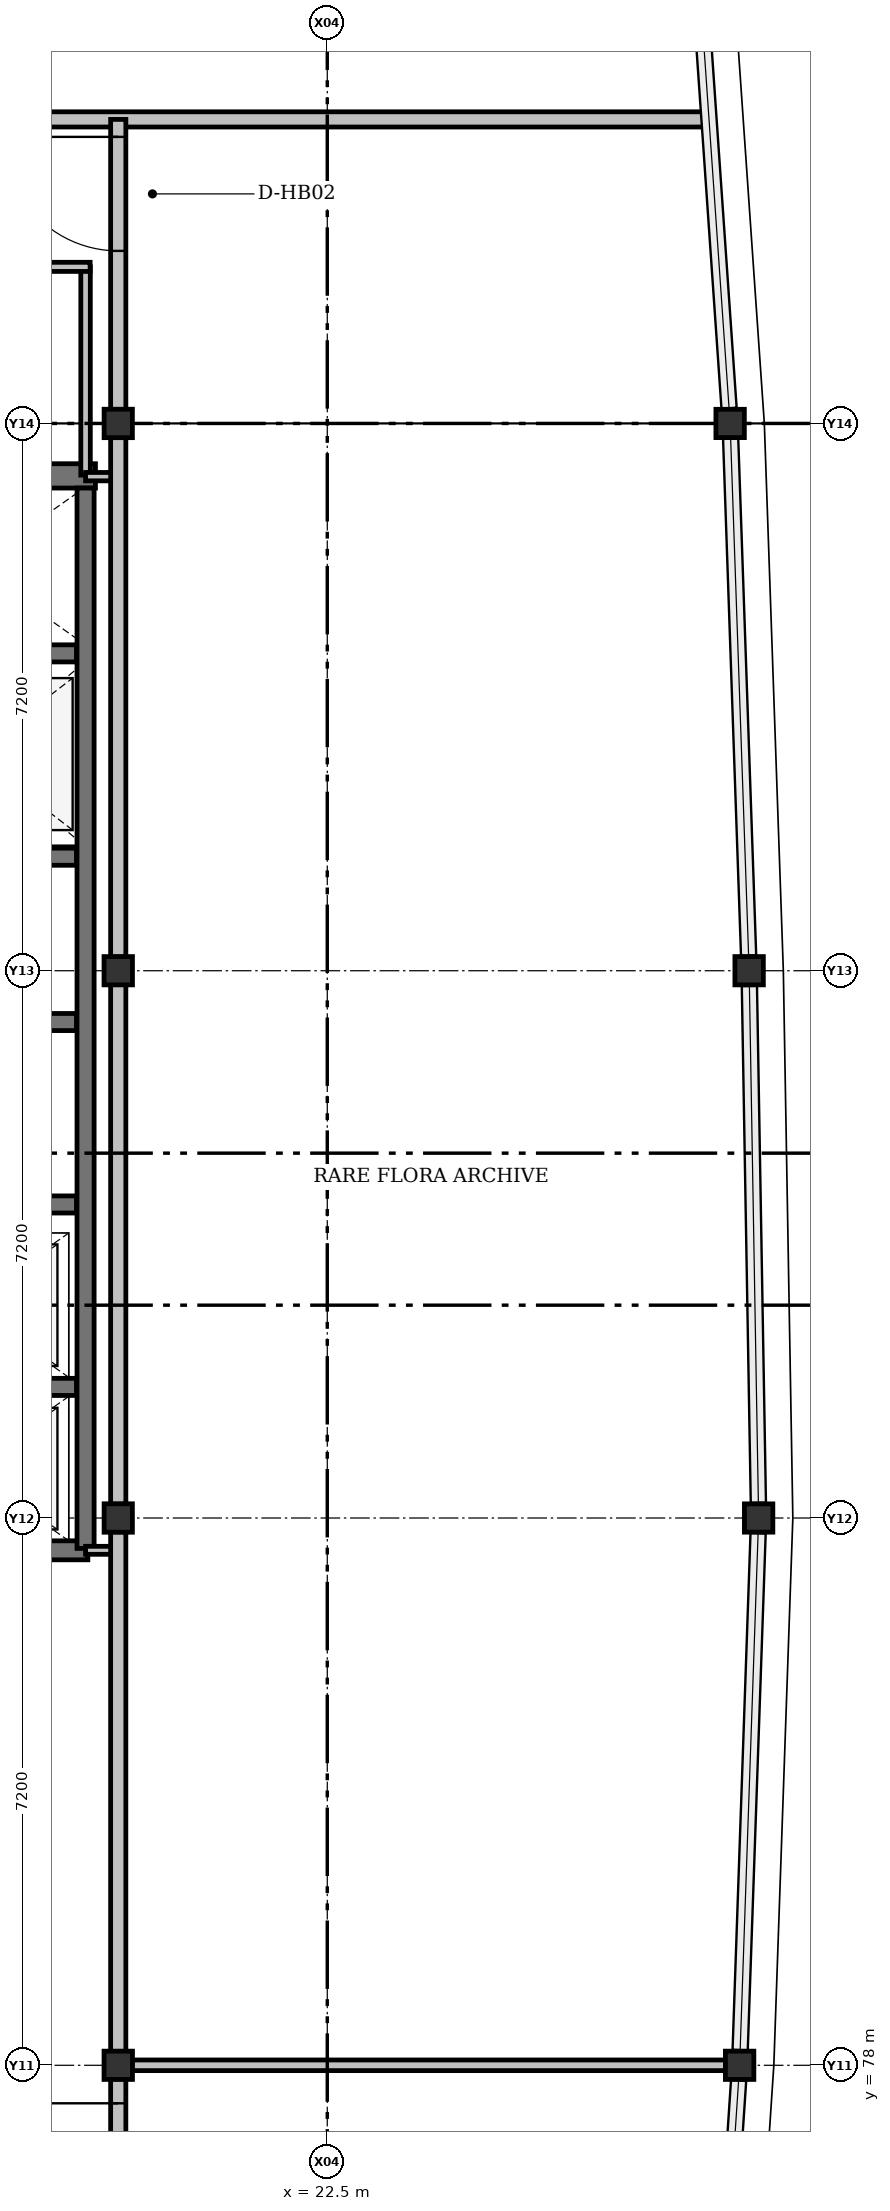
"""IFC4 building model, lengths in metres.
Left out: names, types, materials, properties, quantities, classifications, styles, units other than length and angle.
Written with IfcOpenShell. Run it as: python <this file> out.ifc"""

import sys

from ifc_helpers import new_model, si_unit, direction, frame, frame_2d, origin, origin_2d, place, context, subcontext, project, spatial, rectangle, i_section, extrude, element, fill, save


model = new_model("IFC4")
c1 = context("Model", 3, precision=1e-05, world=origin(), true_north=direction((0.0, 1.0)))
c2 = subcontext(c1, "Body", "Model", "MODEL_VIEW")
j1 = project(units=[si_unit("LENGTHUNIT", "METRE"), si_unit("PLANEANGLEUNIT", "RADIAN")], contexts=[c1])
p1 = place(None, origin())
s1 = spatial("IfcSite", under=j1, at=p1, CompositionType="ELEMENT")
p2 = place(p1, origin())
s2 = spatial("IfcBuilding", under=s1, at=p2, CompositionType="ELEMENT")
p3 = place(p2, frame((0.0, 0.0, 30.9)))
s3 = spatial("IfcBuildingStorey", under=s2, at=p3, CompositionType="ELEMENT", Elevation=30.9)
for number, where, z_axis, x_axis in (
    (1, (19.75, 78.0, 0.0), (0.0, 0.0, 1.0), (1.0, 0.0, 0.0)),
    (2, (27.925, 78.0, 0.0), (0.0, 0.0, 1.0), (1.0, 0.0, 0.0)),
    (3, (19.75, 85.2, 0.0), (0.0, 0.0, 1.0), (0.0, 1.0, 0.0)),
    (4, (28.175, 85.2, 0.0), (0.0, 0.0, 1.0), (1.0, 0.0, 0.0)),
    (5, (19.75, 92.4, 0.0), (0.0, 0.0, 1.0), (1.0, 0.0, 0.0)),
    (6, (28.05, 92.4, 0.0), (0.0, 0.0, 1.0), (1.0, 0.0, 0.0)),
    (7, (19.75, 99.6, 0.0), (0.0, 0.0, 1.0), (0.0, 1.0, 0.0)),
    (8, (27.8, 99.6, 0.0), (0.0, 0.0, 1.0), (1.0, 0.0, 0.0)),
):
    element("IfcColumn", number, at=place(p3, frame(where, z_axis=z_axis, x_axis=x_axis)), inside=s3, PredefinedType="COLUMN", context=c2, shape_type="SweptSolid", body=[
        extrude(i_section(OverallWidth=0.374, OverallDepth=0.372, WebThickness=0.016, FlangeThickness=0.026, FilletRadius=0.015, at=origin_2d()), origin(), (0.0, 0.0, 1.0), 4.2),
    ])
p4 = place(p3, frame((16.15, 98.91, 0.0), z_axis=(0.0, 0.0, 1.0), x_axis=(1.0, 0.0, 0.0)))
e9 = element("IfcWall", 9, at=p4, inside=s3, PredefinedType="SHEAR", context=c2, shape_type="SweptSolid", body=[
    extrude(rectangle(XDim=3.3, YDim=0.32, at=frame_2d((1.65, 0.0))), origin(), (0.0, 0.0, 1.0), 4.2),
])
p5 = place(p3, frame((16.4, 84.775, 0.0), z_axis=(0.0, 0.0, 1.0), x_axis=(1.0, 0.0, 0.0)))
e10 = element("IfcWall", 10, at=p5, inside=s3, PredefinedType="SHEAR", context=c2, shape_type="SweptSolid", body=[
    extrude(rectangle(XDim=2.95, YDim=0.25, at=frame_2d((1.475, 0.0))), origin(), (0.0, 0.0, 1.0), 4.2),
])
p6 = place(p3, frame((19.32, 84.8, 0.0), z_axis=(0.0, 0.0, 1.0), x_axis=(0.0, 1.0, 0.0)))
e11 = element("IfcWall", 11, at=p6, inside=s3, PredefinedType="SHEAR", context=c2, shape_type="SweptSolid", body=[
    extrude(rectangle(XDim=13.95, YDim=0.225, at=frame_2d((6.975, 0.0))), origin(), (0.0, 0.0, 1.0), 4.2),
])
for number, where, z_axis, x_axis in (
    (12, (16.4, 86.925, 0.0), (0.0, 0.0, 1.0), (1.0, 0.0, 0.0)),
    (13, (16.4, 89.325, 0.0), (0.0, 0.0, 1.0), (1.0, 0.0, 0.0)),
    (14, (16.4, 91.725, 0.0), (0.0, 0.0, 1.0), (1.0, 0.0, 0.0)),
    (15, (16.4, 93.9, 0.0), (0.0, 0.0, 1.0), (1.0, 0.0, 0.0)),
    (16, (16.4, 96.575, 0.0), (0.0, 0.0, 1.0), (1.0, 0.0, 0.0)),
):
    element("IfcWall", number, at=place(p3, frame(where, z_axis=z_axis, x_axis=x_axis)), inside=s3, PredefinedType="SHEAR", context=c2, shape_type="SweptSolid", body=[
        extrude(rectangle(XDim=2.8, YDim=0.225, at=frame_2d((1.4, 0.0))), origin(), (0.0, 0.0, 1.0), 4.2),
    ])
p7 = place(p3, frame((19.32, 98.92, 0.0), z_axis=(0.0, 0.0, 1.0), x_axis=(0.0, 1.0, 0.0)))
e17 = element("IfcWall", 17, at=p7, inside=s3, PredefinedType="PARTITIONING", context=c2, shape_type="SweptSolid", body=[
    extrude(rectangle(XDim=2.74, YDim=0.125, at=frame_2d((1.37, 0.0))), origin(), (0.0, 0.0, 1.0), 3.436),
])
p8 = place(p3, frame((19.38, 101.66, 0.0), z_axis=(0.0, 0.0, 1.0), x_axis=(-1.0, 0.0, 0.0)))
e18 = element("IfcWall", 18, at=p8, inside=s3, PredefinedType="PARTITIONING", context=c2, shape_type="SweptSolid", body=[
    extrude(rectangle(XDim=3.16, YDim=0.12, at=frame_2d((1.58, 0.0))), origin(), (0.0, 0.0, 1.0), 3.95),
])
p9 = place(p3, frame((19.75, 98.9, 0.0), z_axis=(0.0, 0.0, 1.0), x_axis=(-1.0, 0.0, 0.0)))
e19 = element("IfcWall", 19, at=p9, inside=s3, PredefinedType="PARTITIONING", context=c2, shape_type="SweptSolid", body=[
    extrude(rectangle(XDim=0.43, YDim=0.11, at=frame_2d((0.215, 0.0))), origin(), (0.0, 0.0, 1.0), 3.512),
])
p10 = place(p3, frame((19.32, 84.775, 0.0), z_axis=(0.0, 0.0, 1.0), x_axis=(1.0, 0.0, 0.0)))
e20 = element("IfcWall", 20, at=p10, inside=s3, PredefinedType="PARTITIONING", context=c2, shape_type="SweptSolid", body=[
    extrude(rectangle(XDim=0.43, YDim=0.105, at=frame_2d((0.215, 0.0))), origin(), (0.0, 0.0, 1.0), 3.512),
])
p11 = place(p3, frame((7.85, 103.6, 0.0), z_axis=(0.0, 0.0, 1.0), x_axis=(1.0, 0.0, 0.0)))
e21 = element("IfcWall", 21, at=p11, inside=s3, PredefinedType="SOLIDWALL", context=c2, shape_type="SweptSolid", body=[
    extrude(rectangle(XDim=19.69, YDim=0.2, at=frame_2d((9.845, 0.0))), origin(), (0.0, 0.0, 1.0), 3.512),
])
p12 = place(p11, frame((2.075, 0.0, 0.0)))
e22 = element("IfcOpeningElement", 22, at=p12, cuts=e21, PredefinedType="OPENING", context=c2, shape_type="SweptSolid", body=[
    extrude(rectangle(XDim=1.35, YDim=2.25, at=frame_2d((0.675, 1.125))), frame((0.0, 0.1, 0.0), z_axis=(0.0, -1.0, 0.0), x_axis=(1.0, 0.0, 0.0)), (0.0, 0.0, 1.0), 0.2),
])
p13 = place(p3, frame((19.75, 78.181, 0.0), z_axis=(0.0, 0.0, 1.0), x_axis=(0.0, 1.0, 0.0)))
e23 = element("IfcWall", 23, at=p13, inside=s3, PredefinedType="SOLIDWALL", context=c2, shape_type="SweptSolid", body=[
    extrude(rectangle(XDim=6.837, YDim=0.2, at=frame_2d((3.418, 0.0))), origin(), (0.0, 0.0, 1.0), 3.512),
])
for number, where, z_axis, x_axis in (
    (24, (19.75, 85.382, 0.0), (0.0, 0.0, 1.0), (0.0, 1.0, 0.0)),
    (25, (19.75, 92.581, 0.0), (0.0, 0.0, 1.0), (0.0, 1.0, 0.0)),
):
    element("IfcWall", number, at=place(p3, frame(where, z_axis=z_axis, x_axis=x_axis)), inside=s3, PredefinedType="SOLIDWALL", context=c2, shape_type="SweptSolid", body=[
        extrude(rectangle(XDim=6.837, YDim=0.2, at=frame_2d((3.418, 0.0))), origin(), (0.0, 0.0, 1.0), 3.512),
    ])
p14 = place(p3, frame((19.75, 99.782, 0.0), z_axis=(0.0, 0.0, 1.0), x_axis=(0.0, 1.0, 0.0)))
e26 = element("IfcWall", 26, at=p14, inside=s3, PredefinedType="SOLIDWALL", context=c2, shape_type="SweptSolid", body=[
    extrude(rectangle(XDim=3.818, YDim=0.2, at=frame_2d((1.909, 0.0))), origin(), (0.0, 0.0, 1.0), 3.512),
])
p15 = place(p14, frame((2.088, 0.0, 0.0)))
e27 = element("IfcOpeningElement", 27, at=p15, cuts=e26, PredefinedType="OPENING", context=c2, shape_type="SweptSolid", body=[
    extrude(rectangle(XDim=1.5, YDim=2.3, at=frame_2d((0.75, 1.15))), frame((0.0, 0.1, 0.0), z_axis=(0.0, -1.0, 0.0), x_axis=(1.0, 0.0, 0.0)), (0.0, 0.0, 1.0), 0.2),
])
p16 = place(p3, frame((27.743, 78.0, 0.0), z_axis=(0.0, 0.0, 1.0), x_axis=(-1.0, 0.0, 0.0)))
e28 = element("IfcWall", 28, at=p16, inside=s3, PredefinedType="PARTITIONING", context=c2, shape_type="SweptSolid", body=[
    extrude(rectangle(XDim=7.811, YDim=0.14, at=frame_2d((3.906, 0.0))), origin(), (0.0, 0.0, 1.0), 2.775),
])
p17 = place(p3, frame((19.75, 70.682, 0.0), z_axis=(0.0, 0.0, 1.0), x_axis=(0.0, 1.0, 0.0)))
e29 = element("IfcWall", 29, at=p17, inside=s3, PredefinedType="SOLIDWALL", context=c2, shape_type="SweptSolid", body=[
    extrude(rectangle(XDim=7.137, YDim=0.2, at=frame_2d((3.569, 0.0))), origin(), (0.0, 0.0, 1.0), 3.512),
])
p18 = place(p17, frame((5.318, 0.0, 0.0)))
e30 = element("IfcOpeningElement", 30, at=p18, cuts=e29, PredefinedType="OPENING", context=c2, shape_type="SweptSolid", body=[
    extrude(rectangle(XDim=1.5, YDim=2.3, at=frame_2d((0.75, 1.15))), frame((0.0, 0.1, 0.0), z_axis=(0.0, -1.0, 0.0), x_axis=(1.0, 0.0, 0.0)), (0.0, 0.0, 1.0), 0.2),
])
p19 = place(p15, origin())
e31 = element("IfcDoor", 31, at=p19, inside=s3, OperationType="SINGLE_SWING_RIGHT", PredefinedType="DOOR", context=c2, shape_type="SweptSolid", body=[
    extrude(rectangle(XDim=1.5, YDim=2.3, at=frame_2d((0.75, 1.15))), frame((0.0, 0.025, 0.0), z_axis=(0.0, -1.0, 0.0), x_axis=(1.0, 0.0, 0.0)), (0.0, 0.0, 1.0), 0.05),
])
fill(e27, e31)
p20 = place(p18, origin())
e32 = element("IfcDoor", 32, at=p20, inside=s3, OperationType="SINGLE_SWING_RIGHT", PredefinedType="DOOR", context=c2, shape_type="SweptSolid", body=[
    extrude(rectangle(XDim=1.5, YDim=2.3, at=frame_2d((0.75, 1.15))), frame((0.0, 0.025, 0.0), z_axis=(0.0, -1.0, 0.0), x_axis=(1.0, 0.0, 0.0)), (0.0, 0.0, 1.0), 0.05),
])
fill(e30, e32)
save(model, sys.argv[1])
